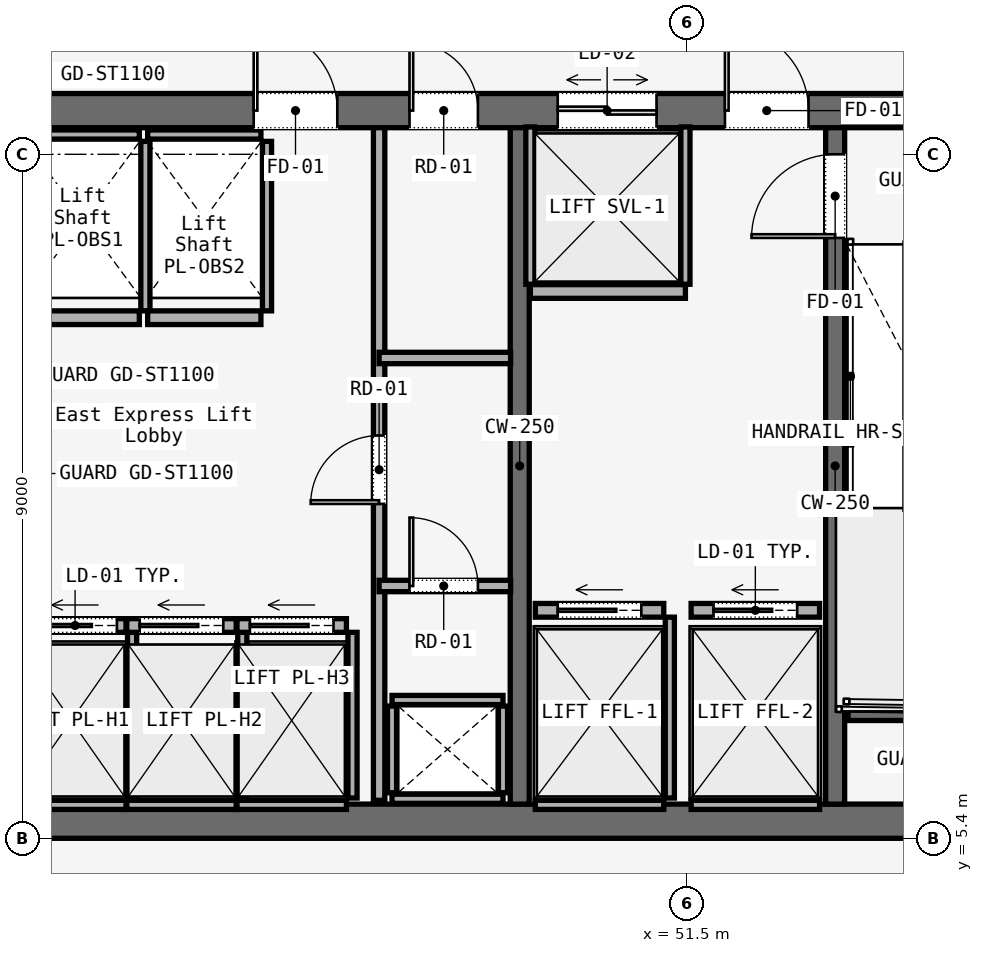
"""IFC4 building model, lengths in metres.
Left out: names, types, materials, properties, quantities, classifications, styles, units other than length and angle.
Written with IfcOpenShell. Run it as: python <this file> out.ifc"""

import sys

from ifc_helpers import new_model, si_unit, direction, frame, frame_2d, origin, place, context, subcontext, project, spatial, rectangle, extrude, element, fill, save


model = new_model("IFC4")
c1 = context("Model", 3, precision=1e-05, world=origin(), true_north=direction((0.0, 1.0)))
c2 = subcontext(c1, "Body", "Model", "MODEL_VIEW")
j1 = project(units=[si_unit("LENGTHUNIT", "METRE"), si_unit("PLANEANGLEUNIT", "RADIAN")], contexts=[c1])
p1 = place(None, origin())
s1 = spatial("IfcSite", under=j1, at=p1, CompositionType="ELEMENT")
p2 = place(p1, origin())
s2 = spatial("IfcBuilding", under=s1, at=p2, CompositionType="ELEMENT")
p3 = place(p2, frame((0.0, 0.0, 117.4)))
s3 = spatial("IfcBuildingStorey", under=s2, at=p3, CompositionType="ELEMENT", Elevation=117.4)
p4 = place(p3, frame((26.45, 14.975, 0.0), z_axis=(0.0, 0.0, 1.0), x_axis=(1.0, 0.0, 0.0)))
e1 = element("IfcWall", 1, at=p4, inside=s3, PredefinedType="SOLIDWALL", context=c2, shape_type="SweptSolid", body=[
    extrude(rectangle(XDim=31.1, YDim=0.45, at=frame_2d((15.55, 0.0))), origin(), (0.0, 0.0, 1.0), 4.52),
])
p5 = place(p4, frame((1.65, 0.0, 0.0)))
e2 = element("IfcOpeningElement", 2, at=p5, cuts=e1, PredefinedType="OPENING", context=c2, shape_type="SweptSolid", body=[
    extrude(rectangle(XDim=1.1, YDim=2.2, at=frame_2d((0.55, 1.1))), frame((0.0, 0.225, 0.0), z_axis=(0.0, -1.0, 0.0), x_axis=(1.0, 0.0, 0.0)), (0.0, 0.0, 1.0), 0.45),
])
p6 = place(p4, frame((13.65, 0.0, 0.0)))
e3 = element("IfcOpeningElement", 3, at=p6, cuts=e1, PredefinedType="OPENING", context=c2, shape_type="SweptSolid", body=[
    extrude(rectangle(XDim=1.1, YDim=2.2, at=frame_2d((0.55, 1.1))), frame((0.0, 0.225, 0.0), z_axis=(0.0, -1.0, 0.0), x_axis=(1.0, 0.0, 0.0)), (0.0, 0.0, 1.0), 0.45),
])
p7 = place(p4, frame((25.55, 0.0, 0.0)))
e4 = element("IfcOpeningElement", 4, at=p7, cuts=e1, PredefinedType="OPENING", context=c2, shape_type="SweptSolid", body=[
    extrude(rectangle(XDim=1.1, YDim=2.2, at=frame_2d((0.55, 1.1))), frame((0.0, 0.225, 0.0), z_axis=(0.0, -1.0, 0.0), x_axis=(1.0, 0.0, 0.0)), (0.0, 0.0, 1.0), 0.45),
])
p8 = place(p4, frame((10.7, 0.0, 0.0)))
e5 = element("IfcOpeningElement", 5, at=p8, cuts=e1, PredefinedType="OPENING", context=c2, shape_type="SweptSolid", body=[
    extrude(rectangle(XDim=1.4, YDim=2.2, at=frame_2d((0.7, 1.1))), frame((0.0, 0.225, 0.0), z_axis=(0.0, -1.0, 0.0), x_axis=(1.0, 0.0, 0.0)), (0.0, 0.0, 1.0), 0.45),
])
p9 = place(p4, frame((19.35, 0.0, 0.0)))
e6 = element("IfcOpeningElement", 6, at=p9, cuts=e1, PredefinedType="OPENING", context=c2, shape_type="SweptSolid", body=[
    extrude(rectangle(XDim=1.1, YDim=2.2, at=frame_2d((0.55, 1.1))), frame((0.0, 0.225, 0.0), z_axis=(0.0, -1.0, 0.0), x_axis=(1.0, 0.0, 0.0)), (0.0, 0.0, 1.0), 0.45),
])
p10 = place(p4, frame((21.4, 0.0, 0.0)))
e7 = element("IfcOpeningElement", 7, at=p10, cuts=e1, PredefinedType="OPENING", context=c2, shape_type="SweptSolid", body=[
    extrude(rectangle(XDim=0.9, YDim=2.1, at=frame_2d((0.45, 1.05))), frame((0.0, 0.225, 0.0), z_axis=(0.0, -1.0, 0.0), x_axis=(1.0, 0.0, 0.0)), (0.0, 0.0, 1.0), 0.45),
])
p11 = place(p4, frame((23.35, 0.0, 0.0)))
e8 = element("IfcOpeningElement", 8, at=p11, cuts=e1, PredefinedType="OPENING", context=c2, shape_type="SweptSolid", body=[
    extrude(rectangle(XDim=1.3, YDim=2.3, at=frame_2d((0.65, 1.15))), frame((0.0, 0.225, 0.0), z_axis=(0.0, -1.0, 0.0), x_axis=(1.0, 0.0, 0.0)), (0.0, 0.0, 1.0), 0.45),
])
p12 = place(p3, frame((26.45, 5.625, 0.0), z_axis=(0.0, 0.0, 1.0), x_axis=(1.0, 0.0, 0.0)))
e9 = element("IfcWall", 9, at=p12, inside=s3, PredefinedType="SOLIDWALL", context=c2, shape_type="SweptSolid", body=[
    extrude(rectangle(XDim=31.1, YDim=0.45, at=frame_2d((15.55, 0.0))), origin(), (0.0, 0.0, 1.0), 4.52),
])
p13 = place(p3, frame((49.3, 5.85, 0.0), z_axis=(0.0, 0.0, 1.0), x_axis=(0.0, 1.0, 0.0)))
e10 = element("IfcWall", 10, at=p13, inside=s3, PredefinedType="SOLIDWALL", context=c2, shape_type="SweptSolid", body=[
    extrude(rectangle(XDim=8.9, YDim=0.25, at=frame_2d((4.45, 0.0))), origin(), (0.0, 0.0, 1.0), 4.52),
])
p14 = place(p3, frame((53.45, 5.85, 0.0), z_axis=(0.0, 0.0, 1.0), x_axis=(0.0, 1.0, 0.0)))
e11 = element("IfcWall", 11, at=p14, inside=s3, PredefinedType="SOLIDWALL", context=c2, shape_type="SweptSolid", body=[
    extrude(rectangle(XDim=8.9, YDim=0.25, at=frame_2d((4.45, 0.0))), origin(), (0.0, 0.0, 1.0), 4.52),
])
p15 = place(p14, frame((7.45, 0.0, 0.0)))
e12 = element("IfcOpeningElement", 12, at=p15, cuts=e11, PredefinedType="OPENING", context=c2, shape_type="SweptSolid", body=[
    extrude(rectangle(XDim=1.1, YDim=2.2, at=frame_2d((0.55, 1.1))), frame((0.0, 0.125, 0.0), z_axis=(0.0, -1.0, 0.0), x_axis=(1.0, 0.0, 0.0)), (0.0, 0.0, 1.0), 0.25),
])
p16 = place(p3, frame((53.62, 7.05, 0.0), z_axis=(0.0, 0.0, 1.0), x_axis=(1.0, 0.0, 0.0)))
e13 = element("IfcWall", 13, at=p16, inside=s3, PredefinedType="SOLIDWALL", context=c2, shape_type="SweptSolid", body=[
    extrude(rectangle(XDim=3.115, YDim=0.2, at=frame_2d((1.558, 0.0))), origin(), (0.0, 0.0, 1.0), 4.8),
])
for number, where, z_axis, x_axis in (
    (14, (47.62, 5.92, 0.0), (0.0, 0.0, 1.0), (1.0, 0.0, 0.0)),
    (15, (47.62, 7.22, 0.0), (0.0, 0.0, 1.0), (1.0, 0.0, 0.0)),
):
    element("IfcWall", number, at=place(p3, frame(where, z_axis=z_axis, x_axis=x_axis)), inside=s3, PredefinedType="SOLIDWALL", context=c2, shape_type="SweptSolid", body=[
        extrude(rectangle(XDim=1.46, YDim=0.12, at=frame_2d((0.73, 0.0))), origin(), (0.0, 0.0, 1.0), 3.39),
    ])
for number, where, z_axis, x_axis in (
    (16, (47.62, 6.0, 0.0), (0.0, 0.0, 1.0), (0.0, 1.0, 0.0)),
    (17, (49.08, 6.0, 0.0), (0.0, 0.0, 1.0), (0.0, 1.0, 0.0)),
):
    element("IfcWall", number, at=place(p3, frame(where, z_axis=z_axis, x_axis=x_axis)), inside=s3, PredefinedType="SOLIDWALL", context=c2, shape_type="SweptSolid", body=[
        extrude(rectangle(XDim=1.14, YDim=0.12, at=frame_2d((0.57, 0.0))), origin(), (0.0, 0.0, 1.0), 3.39),
    ])
p17 = place(p3, frame((47.45, 5.9, 0.0), z_axis=(0.0, 0.0, 1.0), x_axis=(0.0, 1.0, 0.0)))
e18 = element("IfcWall", 18, at=p17, inside=s3, PredefinedType="PARTITIONING", context=c2, shape_type="SweptSolid", body=[
    extrude(rectangle(XDim=8.85, YDim=0.15, at=frame_2d((4.425, 0.0))), origin(), (0.0, 0.0, 1.0), 3.39),
])
p18 = place(p17, frame((3.9, 0.0, 0.0)))
e19 = element("IfcOpeningElement", 19, at=p18, cuts=e18, PredefinedType="OPENING", context=c2, shape_type="SweptSolid", body=[
    extrude(rectangle(XDim=0.9, YDim=2.1, at=frame_2d((0.45, 1.05))), frame((0.0, 0.075, 0.0), z_axis=(0.0, -1.0, 0.0), x_axis=(1.0, 0.0, 0.0)), (0.0, 0.0, 1.0), 0.15),
])
p19 = place(p3, frame((47.45, 8.72, 0.0), z_axis=(0.0, 0.0, 1.0), x_axis=(1.0, 0.0, 0.0)))
e20 = element("IfcWall", 20, at=p19, inside=s3, PredefinedType="PARTITIONING", context=c2, shape_type="SweptSolid", body=[
    extrude(rectangle(XDim=1.73, YDim=0.15, at=frame_2d((0.865, 0.0))), origin(), (0.0, 0.0, 1.0), 3.39),
])
p20 = place(p19, frame((0.4, 0.0, 0.0)))
e21 = element("IfcOpeningElement", 21, at=p20, cuts=e20, PredefinedType="OPENING", context=c2, shape_type="SweptSolid", body=[
    extrude(rectangle(XDim=0.9, YDim=2.1, at=frame_2d((0.45, 1.05))), frame((0.0, 0.075, 0.0), z_axis=(0.0, -1.0, 0.0), x_axis=(1.0, 0.0, 0.0)), (0.0, 0.0, 1.0), 0.15),
])
p21 = place(p3, frame((47.45, 11.72, 0.0), z_axis=(0.0, 0.0, 1.0), x_axis=(1.0, 0.0, 0.0)))
e22 = element("IfcWall", 22, at=p21, inside=s3, PredefinedType="PARTITIONING", context=c2, shape_type="SweptSolid", body=[
    extrude(rectangle(XDim=1.73, YDim=0.15, at=frame_2d((0.865, 0.0))), origin(), (0.0, 0.0, 1.0), 3.39),
])
p22 = place(p3, frame((42.78, 8.2, 0.0), z_axis=(0.0, 0.0, 1.0), x_axis=(1.0, 0.0, 0.0)))
e23 = element("IfcWall", 23, at=p22, inside=s3, PredefinedType="SOLIDWALL", context=c2, shape_type="SweptSolid", body=[
    extrude(rectangle(XDim=1.34, YDim=0.18, at=frame_2d((0.67, 0.0))), origin(), (0.0, 0.0, 1.0), 3.39),
])
p23 = place(p22, frame((0.12, 0.0, 0.0)))
e24 = element("IfcOpeningElement", 24, at=p23, cuts=e23, PredefinedType="OPENING", context=c2, shape_type="SweptSolid", body=[
    extrude(rectangle(XDim=1.1, YDim=2.2, at=frame_2d((0.55, 1.1))), frame((0.0, 0.09, 0.0), z_axis=(0.0, -1.0, 0.0), x_axis=(1.0, 0.0, 0.0)), (0.0, 0.0, 1.0), 0.18),
])
p24 = place(p3, frame((42.78, 5.84, 0.0), z_axis=(0.0, 0.0, 1.0), x_axis=(1.0, 0.0, 0.0)))
e25 = element("IfcWall", 25, at=p24, inside=s3, PredefinedType="SOLIDWALL", context=c2, shape_type="SweptSolid", body=[
    extrude(rectangle(XDim=1.34, YDim=0.12, at=frame_2d((0.67, 0.0))), origin(), (0.0, 0.0, 1.0), 3.39),
])
p25 = place(p3, frame((44.2, 5.93, 0.0), z_axis=(0.0, 0.0, 1.0), x_axis=(0.0, 1.0, 0.0)))
e26 = element("IfcWall", 26, at=p25, inside=s3, PredefinedType="SOLIDWALL", context=c2, shape_type="SweptSolid", body=[
    extrude(rectangle(XDim=2.18, YDim=0.12, at=frame_2d((1.09, 0.0))), origin(), (0.0, 0.0, 1.0), 3.39),
])
p26 = place(p3, frame((44.13, 8.2, 0.0), z_axis=(0.0, 0.0, 1.0), x_axis=(1.0, 0.0, 0.0)))
e27 = element("IfcWall", 27, at=p26, inside=s3, PredefinedType="SOLIDWALL", context=c2, shape_type="SweptSolid", body=[
    extrude(rectangle(XDim=1.44, YDim=0.18, at=frame_2d((0.72, 0.0))), origin(), (0.0, 0.0, 1.0), 3.39),
])
p27 = place(p26, frame((0.17, 0.0, 0.0)))
e28 = element("IfcOpeningElement", 28, at=p27, cuts=e27, PredefinedType="OPENING", context=c2, shape_type="SweptSolid", body=[
    extrude(rectangle(XDim=1.1, YDim=2.2, at=frame_2d((0.55, 1.1))), frame((0.0, 0.09, 0.0), z_axis=(0.0, -1.0, 0.0), x_axis=(1.0, 0.0, 0.0)), (0.0, 0.0, 1.0), 0.18),
])
p28 = place(p3, frame((44.13, 5.84, 0.0), z_axis=(0.0, 0.0, 1.0), x_axis=(1.0, 0.0, 0.0)))
e29 = element("IfcWall", 29, at=p28, inside=s3, PredefinedType="SOLIDWALL", context=c2, shape_type="SweptSolid", body=[
    extrude(rectangle(XDim=1.44, YDim=0.12, at=frame_2d((0.72, 0.0))), origin(), (0.0, 0.0, 1.0), 3.39),
])
p29 = place(p3, frame((45.65, 5.93, 0.0), z_axis=(0.0, 0.0, 1.0), x_axis=(0.0, 1.0, 0.0)))
e30 = element("IfcWall", 30, at=p29, inside=s3, PredefinedType="SOLIDWALL", context=c2, shape_type="SweptSolid", body=[
    extrude(rectangle(XDim=2.18, YDim=0.12, at=frame_2d((1.09, 0.0))), origin(), (0.0, 0.0, 1.0), 3.39),
])
p30 = place(p3, frame((45.58, 8.2, 0.0), z_axis=(0.0, 0.0, 1.0), x_axis=(1.0, 0.0, 0.0)))
e31 = element("IfcWall", 31, at=p30, inside=s3, PredefinedType="SOLIDWALL", context=c2, shape_type="SweptSolid", body=[
    extrude(rectangle(XDim=1.44, YDim=0.18, at=frame_2d((0.72, 0.0))), origin(), (0.0, 0.0, 1.0), 3.39),
])
p31 = place(p30, frame((0.17, 0.0, 0.0)))
e32 = element("IfcOpeningElement", 32, at=p31, cuts=e31, PredefinedType="OPENING", context=c2, shape_type="SweptSolid", body=[
    extrude(rectangle(XDim=1.1, YDim=2.2, at=frame_2d((0.55, 1.1))), frame((0.0, 0.09, 0.0), z_axis=(0.0, -1.0, 0.0), x_axis=(1.0, 0.0, 0.0)), (0.0, 0.0, 1.0), 0.18),
])
p32 = place(p3, frame((45.58, 5.84, 0.0), z_axis=(0.0, 0.0, 1.0), x_axis=(1.0, 0.0, 0.0)))
e33 = element("IfcWall", 33, at=p32, inside=s3, PredefinedType="SOLIDWALL", context=c2, shape_type="SweptSolid", body=[
    extrude(rectangle(XDim=1.44, YDim=0.12, at=frame_2d((0.72, 0.0))), origin(), (0.0, 0.0, 1.0), 3.39),
])
p33 = place(p3, frame((47.1, 5.93, 0.0), z_axis=(0.0, 0.0, 1.0), x_axis=(0.0, 1.0, 0.0)))
e34 = element("IfcWall", 34, at=p33, inside=s3, PredefinedType="SOLIDWALL", context=c2, shape_type="SweptSolid", body=[
    extrude(rectangle(XDim=2.18, YDim=0.12, at=frame_2d((1.09, 0.0))), origin(), (0.0, 0.0, 1.0), 3.39),
])
p34 = place(p3, frame((42.805, 12.25, 0.0), z_axis=(0.0, 0.0, 1.0), x_axis=(1.0, 0.0, 0.0)))
e35 = element("IfcWall", 35, at=p34, inside=s3, PredefinedType="SOLIDWALL", context=c2, shape_type="SweptSolid", body=[
    extrude(rectangle(XDim=1.49, YDim=0.18, at=frame_2d((0.745, 0.0))), origin(), (0.0, 0.0, 1.0), 3.39),
])
p35 = place(p3, frame((42.805, 14.66, 0.0), z_axis=(0.0, 0.0, 1.0), x_axis=(1.0, 0.0, 0.0)))
e36 = element("IfcWall", 36, at=p35, inside=s3, PredefinedType="SOLIDWALL", context=c2, shape_type="SweptSolid", body=[
    extrude(rectangle(XDim=1.49, YDim=0.12, at=frame_2d((0.745, 0.0))), origin(), (0.0, 0.0, 1.0), 3.39),
])
p36 = place(p3, frame((44.375, 12.34, 0.0), z_axis=(0.0, 0.0, 1.0), x_axis=(0.0, 1.0, 0.0)))
e37 = element("IfcWall", 37, at=p36, inside=s3, PredefinedType="SOLIDWALL", context=c2, shape_type="SweptSolid", body=[
    extrude(rectangle(XDim=2.23, YDim=0.12, at=frame_2d((1.115, 0.0))), origin(), (0.0, 0.0, 1.0), 3.39),
])
p37 = place(p3, frame((44.405, 12.25, 0.0), z_axis=(0.0, 0.0, 1.0), x_axis=(1.0, 0.0, 0.0)))
e38 = element("IfcWall", 38, at=p37, inside=s3, PredefinedType="SOLIDWALL", context=c2, shape_type="SweptSolid", body=[
    extrude(rectangle(XDim=1.49, YDim=0.18, at=frame_2d((0.745, 0.0))), origin(), (0.0, 0.0, 1.0), 3.39),
])
p38 = place(p3, frame((44.405, 14.66, 0.0), z_axis=(0.0, 0.0, 1.0), x_axis=(1.0, 0.0, 0.0)))
e39 = element("IfcWall", 39, at=p38, inside=s3, PredefinedType="SOLIDWALL", context=c2, shape_type="SweptSolid", body=[
    extrude(rectangle(XDim=1.49, YDim=0.12, at=frame_2d((0.745, 0.0))), origin(), (0.0, 0.0, 1.0), 3.39),
])
p39 = place(p3, frame((45.975, 12.34, 0.0), z_axis=(0.0, 0.0, 1.0), x_axis=(0.0, 1.0, 0.0)))
e40 = element("IfcWall", 40, at=p39, inside=s3, PredefinedType="SOLIDWALL", context=c2, shape_type="SweptSolid", body=[
    extrude(rectangle(XDim=2.23, YDim=0.12, at=frame_2d((1.115, 0.0))), origin(), (0.0, 0.0, 1.0), 3.39),
])
p40 = place(p3, frame((49.505, 8.4, 0.0), z_axis=(0.0, 0.0, 1.0), x_axis=(1.0, 0.0, 0.0)))
e41 = element("IfcWall", 41, at=p40, inside=s3, PredefinedType="SOLIDWALL", context=c2, shape_type="SweptSolid", body=[
    extrude(rectangle(XDim=1.69, YDim=0.18, at=frame_2d((0.845, 0.0))), origin(), (0.0, 0.0, 1.0), 3.39),
])
p41 = place(p40, frame((0.295, 0.0, 0.0)))
e42 = element("IfcOpeningElement", 42, at=p41, cuts=e41, PredefinedType="OPENING", context=c2, shape_type="SweptSolid", body=[
    extrude(rectangle(XDim=1.1, YDim=2.2, at=frame_2d((0.55, 1.1))), frame((0.0, 0.09, 0.0), z_axis=(0.0, -1.0, 0.0), x_axis=(1.0, 0.0, 0.0)), (0.0, 0.0, 1.0), 0.18),
])
p42 = place(p3, frame((49.505, 5.84, 0.0), z_axis=(0.0, 0.0, 1.0), x_axis=(1.0, 0.0, 0.0)))
e43 = element("IfcWall", 43, at=p42, inside=s3, PredefinedType="SOLIDWALL", context=c2, shape_type="SweptSolid", body=[
    extrude(rectangle(XDim=1.69, YDim=0.12, at=frame_2d((0.845, 0.0))), origin(), (0.0, 0.0, 1.0), 3.39),
])
p43 = place(p3, frame((51.275, 5.93, 0.0), z_axis=(0.0, 0.0, 1.0), x_axis=(0.0, 1.0, 0.0)))
e44 = element("IfcWall", 44, at=p43, inside=s3, PredefinedType="SOLIDWALL", context=c2, shape_type="SweptSolid", body=[
    extrude(rectangle(XDim=2.38, YDim=0.12, at=frame_2d((1.19, 0.0))), origin(), (0.0, 0.0, 1.0), 3.39),
])
p44 = place(p3, frame((51.555, 8.4, 0.0), z_axis=(0.0, 0.0, 1.0), x_axis=(1.0, 0.0, 0.0)))
e45 = element("IfcWall", 45, at=p44, inside=s3, PredefinedType="SOLIDWALL", context=c2, shape_type="SweptSolid", body=[
    extrude(rectangle(XDim=1.69, YDim=0.18, at=frame_2d((0.845, 0.0))), origin(), (0.0, 0.0, 1.0), 3.39),
])
p45 = place(p44, frame((0.295, 0.0, 0.0)))
e46 = element("IfcOpeningElement", 46, at=p45, cuts=e45, PredefinedType="OPENING", context=c2, shape_type="SweptSolid", body=[
    extrude(rectangle(XDim=1.1, YDim=2.2, at=frame_2d((0.55, 1.1))), frame((0.0, 0.09, 0.0), z_axis=(0.0, -1.0, 0.0), x_axis=(1.0, 0.0, 0.0)), (0.0, 0.0, 1.0), 0.18),
])
p46 = place(p3, frame((51.555, 5.84, 0.0), z_axis=(0.0, 0.0, 1.0), x_axis=(1.0, 0.0, 0.0)))
e47 = element("IfcWall", 47, at=p46, inside=s3, PredefinedType="SOLIDWALL", context=c2, shape_type="SweptSolid", body=[
    extrude(rectangle(XDim=1.69, YDim=0.12, at=frame_2d((0.845, 0.0))), origin(), (0.0, 0.0, 1.0), 3.39),
])
p47 = place(p3, frame((49.44, 12.595, 0.0), z_axis=(0.0, 0.0, 1.0), x_axis=(1.0, 0.0, 0.0)))
e48 = element("IfcWall", 48, at=p47, inside=s3, PredefinedType="SOLIDWALL", context=c2, shape_type="SweptSolid", body=[
    extrude(rectangle(XDim=2.04, YDim=0.18, at=frame_2d((1.02, 0.0))), origin(), (0.0, 0.0, 1.0), 3.39),
])
for number, where, z_axis, x_axis in (
    (49, (49.44, 12.69, 0.0), (0.0, 0.0, 1.0), (0.0, 1.0, 0.0)),
    (50, (51.48, 12.69, 0.0), (0.0, 0.0, 1.0), (0.0, 1.0, 0.0)),
):
    element("IfcWall", number, at=place(p3, frame(where, z_axis=z_axis, x_axis=x_axis)), inside=s3, PredefinedType="SOLIDWALL", context=c2, shape_type="SweptSolid", body=[
        extrude(rectangle(XDim=2.07, YDim=0.12, at=frame_2d((1.035, 0.0))), origin(), (0.0, 0.0, 1.0), 3.39),
    ])
p48 = place(p7, origin())
e51 = element("IfcDoor", 51, at=p48, inside=s3, OperationType="SINGLE_SWING_RIGHT", PredefinedType="DOOR", context=c2, shape_type="SweptSolid", body=[
    extrude(rectangle(XDim=1.1, YDim=2.2, at=frame_2d((0.55, 1.1))), frame((0.0, 0.025, 0.0), z_axis=(0.0, -1.0, 0.0), x_axis=(1.0, 0.0, 0.0)), (0.0, 0.0, 1.0), 0.05),
])
fill(e4, e51)
p49 = place(p9, origin())
e52 = element("IfcDoor", 52, at=p49, inside=s3, OperationType="SINGLE_SWING_LEFT", PredefinedType="DOOR", context=c2, shape_type="SweptSolid", body=[
    extrude(rectangle(XDim=1.1, YDim=2.2, at=frame_2d((0.55, 1.1))), frame((0.0, 0.025, 0.0), z_axis=(0.0, -1.0, 0.0), x_axis=(1.0, 0.0, 0.0)), (0.0, 0.0, 1.0), 0.05),
])
fill(e6, e52)
p50 = place(p10, origin())
e53 = element("IfcDoor", 53, at=p50, inside=s3, OperationType="SINGLE_SWING_LEFT", PredefinedType="DOOR", context=c2, shape_type="SweptSolid", body=[
    extrude(rectangle(XDim=0.9, YDim=2.1, at=frame_2d((0.45, 1.05))), frame((0.0, 0.025, 0.0), z_axis=(0.0, -1.0, 0.0), x_axis=(1.0, 0.0, 0.0)), (0.0, 0.0, 1.0), 0.05),
])
fill(e7, e53)
p51 = place(p15, origin())
e54 = element("IfcDoor", 54, at=p51, inside=s3, OperationType="SINGLE_SWING_LEFT", PredefinedType="DOOR", context=c2, shape_type="SweptSolid", body=[
    extrude(rectangle(XDim=1.1, YDim=2.2, at=frame_2d((0.55, 1.1))), frame((0.0, 0.025, 0.0), z_axis=(0.0, -1.0, 0.0), x_axis=(1.0, 0.0, 0.0)), (0.0, 0.0, 1.0), 0.05),
])
fill(e12, e54)
p52 = place(p18, origin())
e55 = element("IfcDoor", 55, at=p52, inside=s3, OperationType="SINGLE_SWING_LEFT", PredefinedType="DOOR", context=c2, shape_type="SweptSolid", body=[
    extrude(rectangle(XDim=0.9, YDim=2.1, at=frame_2d((0.45, 1.05))), frame((0.0, 0.025, 0.0), z_axis=(0.0, -1.0, 0.0), x_axis=(1.0, 0.0, 0.0)), (0.0, 0.0, 1.0), 0.05),
])
fill(e19, e55)
p53 = place(p20, origin())
e56 = element("IfcDoor", 56, at=p53, inside=s3, OperationType="SINGLE_SWING_RIGHT", PredefinedType="DOOR", context=c2, shape_type="SweptSolid", body=[
    extrude(rectangle(XDim=0.9, YDim=2.1, at=frame_2d((0.45, 1.05))), frame((0.0, 0.025, 0.0), z_axis=(0.0, -1.0, 0.0), x_axis=(1.0, 0.0, 0.0)), (0.0, 0.0, 1.0), 0.05),
])
fill(e21, e56)
p54 = place(p23, origin())
e57 = element("IfcDoor", 57, at=p54, inside=s3, OperationType="SLIDING_TO_LEFT", PredefinedType="DOOR", context=c2, shape_type="SweptSolid", body=[
    extrude(rectangle(XDim=1.1, YDim=2.2, at=frame_2d((0.55, 1.1))), frame((0.0, 0.025, 0.0), z_axis=(0.0, -1.0, 0.0), x_axis=(1.0, 0.0, 0.0)), (0.0, 0.0, 1.0), 0.05),
])
fill(e24, e57)
p55 = place(p27, origin())
e58 = element("IfcDoor", 58, at=p55, inside=s3, OperationType="SLIDING_TO_LEFT", PredefinedType="DOOR", context=c2, shape_type="SweptSolid", body=[
    extrude(rectangle(XDim=1.1, YDim=2.2, at=frame_2d((0.55, 1.1))), frame((0.0, 0.025, 0.0), z_axis=(0.0, -1.0, 0.0), x_axis=(1.0, 0.0, 0.0)), (0.0, 0.0, 1.0), 0.05),
])
fill(e28, e58)
p56 = place(p31, origin())
e59 = element("IfcDoor", 59, at=p56, inside=s3, OperationType="SLIDING_TO_LEFT", PredefinedType="DOOR", context=c2, shape_type="SweptSolid", body=[
    extrude(rectangle(XDim=1.1, YDim=2.2, at=frame_2d((0.55, 1.1))), frame((0.0, 0.025, 0.0), z_axis=(0.0, -1.0, 0.0), x_axis=(1.0, 0.0, 0.0)), (0.0, 0.0, 1.0), 0.05),
])
fill(e32, e59)
p57 = place(p41, origin())
e60 = element("IfcDoor", 60, at=p57, inside=s3, OperationType="SLIDING_TO_LEFT", PredefinedType="DOOR", context=c2, shape_type="SweptSolid", body=[
    extrude(rectangle(XDim=1.1, YDim=2.2, at=frame_2d((0.55, 1.1))), frame((0.0, 0.025, 0.0), z_axis=(0.0, -1.0, 0.0), x_axis=(1.0, 0.0, 0.0)), (0.0, 0.0, 1.0), 0.05),
])
fill(e42, e60)
p58 = place(p45, origin())
e61 = element("IfcDoor", 61, at=p58, inside=s3, OperationType="SLIDING_TO_LEFT", PredefinedType="DOOR", context=c2, shape_type="SweptSolid", body=[
    extrude(rectangle(XDim=1.1, YDim=2.2, at=frame_2d((0.55, 1.1))), frame((0.0, 0.025, 0.0), z_axis=(0.0, -1.0, 0.0), x_axis=(1.0, 0.0, 0.0)), (0.0, 0.0, 1.0), 0.05),
])
fill(e46, e61)
p59 = place(p11, origin())
e62 = element("IfcDoor", 62, at=p59, inside=s3, OperationType="DOUBLE_DOOR_SLIDING", PredefinedType="DOOR", context=c2, shape_type="SweptSolid", body=[
    extrude(rectangle(XDim=1.3, YDim=2.3, at=frame_2d((0.65, 1.15))), frame((0.0, 0.025, 0.0), z_axis=(0.0, -1.0, 0.0), x_axis=(1.0, 0.0, 0.0)), (0.0, 0.0, 1.0), 0.05),
])
fill(e8, e62)
save(model, sys.argv[1])
